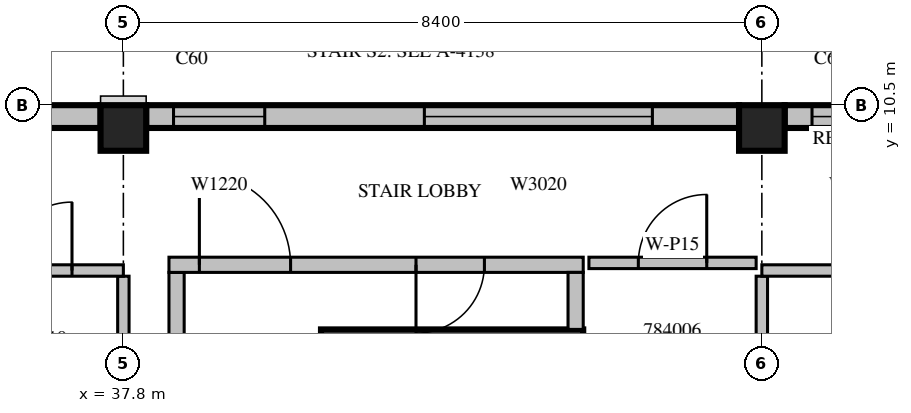
"""IFC4 building model, lengths in metres.
Left out: names, types, materials, properties, quantities, classifications, styles, units other than length and angle.
Written with IfcOpenShell. Run it as: python <this file> out.ifc"""

import sys

from ifc_helpers import new_model, si_unit, direction, frame, frame_2d, origin, origin_2d, place, context, subcontext, project, spatial, rectangle, extrude, source, transform, mapped, element, fill, save


model = new_model("IFC4")
c1 = context("Model", 3, precision=1e-05, world=origin(), true_north=direction((0.0, 1.0)))
c2 = subcontext(c1, "Body", "Model", "MODEL_VIEW")
j1 = project(units=[si_unit("LENGTHUNIT", "METRE"), si_unit("PLANEANGLEUNIT", "RADIAN")], contexts=[c1])
p1 = place(None, origin())
s1 = spatial("IfcSite", under=j1, at=p1, CompositionType="ELEMENT")
p2 = place(p1, origin())
s2 = spatial("IfcBuilding", under=s1, at=p2, CompositionType="ELEMENT")
p3 = place(p2, frame((0.0, 0.0, 354.5)))
s3 = spatial("IfcBuildingStorey", under=s2, at=p3, CompositionType="ELEMENT", Elevation=354.5)
m1 = source(origin(), c2, "Body", "SweptSolid", [
    extrude(rectangle(XDim=0.6, YDim=0.6, at=origin_2d()), origin(), (0.0, 0.0, 1.0), 3.5),
])
for number, where, z_axis, x_axis in (
    (1, (37.8, 10.2, 0.0), (0.0, 0.0, 1.0), (1.0, 0.0, 0.0)),
    (2, (46.2, 10.2, 0.0), (0.0, 0.0, 1.0), (1.0, 0.0, 0.0)),
):
    element("IfcColumn", number, at=place(p3, frame(where, z_axis=z_axis, x_axis=x_axis)), inside=s3, PredefinedType="COLUMN", context=c2, shape_type="MappedRepresentation", body=[
        mapped(m1, transform((0.0, 0.0, 0.0), scale=1.0)),
    ])
m2 = source(origin(), c2, "Body", "SweptSolid", [
    extrude(rectangle(XDim=3.06, YDim=0.3, at=frame_2d((1.53, 0.0))), origin(), (0.0, 0.0, 1.0), 3.1),
])
p4 = place(p3, frame((49.56, 10.35, 0.0), z_axis=(0.0, 0.0, 1.0), x_axis=(-1.0, 0.0, 0.0)))
e3 = element("IfcWall", 3, at=p4, inside=s3, PredefinedType="STANDARD", context=c2, shape_type="MappedRepresentation", body=[
    mapped(m2, transform((0.0, 0.0, 0.0), scale=1.0)),
])
m3 = source(origin(), c2, "Body", "SweptSolid", [
    extrude(rectangle(XDim=1.2, YDim=2.0, at=frame_2d((0.6, 1.0))), frame((0.0, 0.16, 0.0), z_axis=(0.0, -1.0, 0.0), x_axis=(1.0, 0.0, 0.0)), (0.0, 0.0, 1.0), 0.32),
])
p5 = place(p4, frame((1.5, 0.0, 0.6)))
e4 = element("IfcOpeningElement", 4, at=p5, cuts=e3, PredefinedType="OPENING", context=c2, shape_type="MappedRepresentation", body=[
    mapped(m3, transform((0.0, 0.0, 0.0), scale=1.0)),
])
m4 = source(origin(), c2, "Body", "SweptSolid", [
    extrude(rectangle(XDim=7.8, YDim=0.3, at=frame_2d((3.9, 0.0))), origin(), (0.0, 0.0, 1.0), 3.1),
])
p6 = place(p3, frame((45.9, 10.35, 0.0), z_axis=(0.0, 0.0, 1.0), x_axis=(-1.0, 0.0, 0.0)))
e5 = element("IfcWall", 5, at=p6, inside=s3, PredefinedType="STANDARD", context=c2, shape_type="MappedRepresentation", body=[
    mapped(m4, transform((0.0, 0.0, 0.0), scale=1.0)),
])
m5 = source(origin(), c2, "Body", "SweptSolid", [
    extrude(rectangle(XDim=3.0, YDim=2.0, at=frame_2d((1.5, 1.0))), frame((0.0, 0.16, 0.0), z_axis=(0.0, -1.0, 0.0), x_axis=(1.0, 0.0, 0.0)), (0.0, 0.0, 1.0), 0.32),
])
p7 = place(p6, frame((1.14, 0.0, 0.6)))
e6 = element("IfcOpeningElement", 6, at=p7, cuts=e5, PredefinedType="OPENING", context=c2, shape_type="MappedRepresentation", body=[
    mapped(m5, transform((0.0, 0.0, 0.0), scale=1.0)),
])
p8 = place(p6, frame((6.24, 0.0, 0.6)))
e7 = element("IfcOpeningElement", 7, at=p8, cuts=e5, PredefinedType="OPENING", context=c2, shape_type="MappedRepresentation", body=[
    mapped(m3, transform((0.0, 0.0, 0.0), scale=1.0)),
])
p9 = place(p3, frame((37.5, 10.35, 0.0), z_axis=(0.0, 0.0, 1.0), x_axis=(-1.0, 0.0, 0.0)))
e8 = element("IfcWall", 8, at=p9, inside=s3, PredefinedType="STANDARD", context=c2, shape_type="MappedRepresentation", body=[
    mapped(m4, transform((0.0, 0.0, 0.0), scale=1.0)),
])
p10 = place(p9, frame((1.14, 0.0, 0.6)))
e9 = element("IfcOpeningElement", 9, at=p10, cuts=e8, PredefinedType="OPENING", context=c2, shape_type="MappedRepresentation", body=[
    mapped(m5, transform((0.0, 0.0, 0.0), scale=1.0)),
])
p11 = place(p9, frame((6.24, 0.0, 0.6)))
e10 = element("IfcOpeningElement", 10, at=p11, cuts=e8, PredefinedType="OPENING", context=c2, shape_type="MappedRepresentation", body=[
    mapped(m3, transform((0.0, 0.0, 0.0), scale=1.0)),
])
m6 = source(origin(), c2, "Body", "SweptSolid", [
    extrude(rectangle(XDim=3.45, YDim=0.25, at=frame_2d((1.725, 0.0))), origin(), (0.0, 0.0, 1.0), 3.1),
])
p12 = place(p3, frame((40.4, 7.425, 0.0), z_axis=(0.0, 0.0, 1.0), x_axis=(1.0, 0.0, 0.0)))
e11 = element("IfcWall", 11, at=p12, inside=s3, PredefinedType="SOLIDWALL", context=c2, shape_type="MappedRepresentation", body=[
    mapped(m6, transform((0.0, 0.0, 0.0), scale=1.0)),
])
m7 = source(origin(), c2, "Body", "SweptSolid", [
    extrude(rectangle(XDim=8.0, YDim=0.2, at=frame_2d((4.0, 0.0))), origin(), (0.0, 0.0, 1.0), 3.1),
])
p13 = place(p3, frame((38.5, 0.3, 0.0), z_axis=(0.0, 0.0, 1.0), x_axis=(0.0, 1.0, 0.0)))
e12 = element("IfcWall", 12, at=p13, inside=s3, PredefinedType="PARTITIONING", context=c2, shape_type="MappedRepresentation", body=[
    mapped(m7, transform((0.0, 0.0, 0.0), scale=1.0)),
])
m8 = source(origin(), c2, "Body", "SweptSolid", [
    extrude(rectangle(XDim=5.45, YDim=0.2, at=frame_2d((2.725, 0.0))), origin(), (0.0, 0.0, 1.0), 3.1),
])
p14 = place(p3, frame((38.4, 8.4, 0.0), z_axis=(0.0, 0.0, 1.0), x_axis=(1.0, 0.0, 0.0)))
e13 = element("IfcWall", 13, at=p14, inside=s3, PredefinedType="PARTITIONING", context=c2, shape_type="MappedRepresentation", body=[
    mapped(m8, transform((0.0, 0.0, 0.0), scale=1.0)),
])
m9 = source(origin(), c2, "Body", "SweptSolid", [
    extrude(rectangle(XDim=1.2, YDim=2.1, at=frame_2d((0.6, 1.05))), frame((0.0, 0.11, 0.0), z_axis=(0.0, -1.0, 0.0), x_axis=(1.0, 0.0, 0.0)), (0.0, 0.0, 1.0), 0.22),
])
p15 = place(p14, frame((0.4, 0.0, 0.0)))
e14 = element("IfcOpeningElement", 14, at=p15, cuts=e13, PredefinedType="OPENING", context=c2, shape_type="MappedRepresentation", body=[
    mapped(m9, transform((0.0, 0.0, 0.0), scale=1.0)),
])
m10 = source(origin(), c2, "Body", "SweptSolid", [
    extrude(rectangle(XDim=0.9, YDim=2.1, at=frame_2d((0.45, 1.05))), frame((0.0, 0.11, 0.0), z_axis=(0.0, -1.0, 0.0), x_axis=(1.0, 0.0, 0.0)), (0.0, 0.0, 1.0), 0.22),
])
p16 = place(p14, frame((3.25, 0.0, 0.0)))
e15 = element("IfcOpeningElement", 15, at=p16, cuts=e13, PredefinedType="OPENING", context=c2, shape_type="MappedRepresentation", body=[
    mapped(m10, transform((0.0, 0.0, 0.0), scale=1.0)),
])
m11 = source(origin(), c2, "Body", "SweptSolid", [
    extrude(rectangle(XDim=0.75, YDim=0.2, at=frame_2d((0.375, 0.0))), origin(), (0.0, 0.0, 1.0), 3.1),
])
p17 = place(p3, frame((43.75, 7.55, 0.0), z_axis=(0.0, 0.0, 1.0), x_axis=(0.0, 1.0, 0.0)))
e16 = element("IfcWall", 16, at=p17, inside=s3, PredefinedType="PARTITIONING", context=c2, shape_type="MappedRepresentation", body=[
    mapped(m11, transform((0.0, 0.0, 0.0), scale=1.0)),
])
m12 = source(origin(), c2, "Body", "SweptSolid", [
    extrude(rectangle(XDim=2.2, YDim=0.15, at=frame_2d((1.1, 0.0))), origin(), (0.0, 0.0, 1.0), 3.1),
])
p18 = place(p3, frame((46.125, 8.425, 0.0), z_axis=(0.0, 0.0, 1.0), x_axis=(-1.0, 0.0, 0.0)))
e17 = element("IfcWall", 17, at=p18, inside=s3, PredefinedType="PARTITIONING", context=c2, shape_type="MappedRepresentation", body=[
    mapped(m12, transform((0.0, 0.0, 0.0), scale=1.0)),
])
m13 = source(origin(), c2, "Body", "SweptSolid", [
    extrude(rectangle(XDim=0.9, YDim=2.1, at=frame_2d((0.45, 1.05))), frame((0.0, 0.085, 0.0), z_axis=(0.0, -1.0, 0.0), x_axis=(1.0, 0.0, 0.0)), (0.0, 0.0, 1.0), 0.17),
])
p19 = place(p18, frame((0.65, 0.0, 0.0)))
e18 = element("IfcOpeningElement", 18, at=p19, cuts=e17, PredefinedType="OPENING", context=c2, shape_type="MappedRepresentation", body=[
    mapped(m13, transform((0.0, 0.0, 0.0), scale=1.0)),
])
m14 = source(origin(), c2, "Body", "SweptSolid", [
    extrude(rectangle(XDim=2.4, YDim=0.15, at=frame_2d((1.2, 0.0))), origin(), (0.0, 0.0, 1.0), 3.1),
])
for number, where, z_axis, x_axis in (
    (19, (37.8, 5.85, 0.0), (0.0, 0.0, 1.0), (0.0, 1.0, 0.0)),
    (20, (46.2, 5.85, 0.0), (0.0, 0.0, 1.0), (0.0, 1.0, 0.0)),
):
    element("IfcWall", number, at=place(p3, frame(where, z_axis=z_axis, x_axis=x_axis)), inside=s3, PredefinedType="PARTITIONING", context=c2, shape_type="MappedRepresentation", body=[
        mapped(m14, transform((0.0, 0.0, 0.0), scale=1.0)),
    ])
m15 = source(origin(), c2, "Body", "SweptSolid", [
    extrude(rectangle(XDim=8.4, YDim=0.15, at=frame_2d((4.2, 0.0))), origin(), (0.0, 0.0, 1.0), 3.1),
])
p20 = place(p3, frame((37.8, 8.325, 0.0), z_axis=(0.0, 0.0, 1.0), x_axis=(-1.0, 0.0, 0.0)))
e21 = element("IfcWall", 21, at=p20, inside=s3, PredefinedType="PARTITIONING", context=c2, shape_type="MappedRepresentation", body=[
    mapped(m15, transform((0.0, 0.0, 0.0), scale=1.0)),
])
m16 = source(origin(), c2, "Body", "SweptSolid", [
    extrude(rectangle(XDim=1.2, YDim=2.1, at=frame_2d((0.6, 1.05))), frame((0.0, 0.085, 0.0), z_axis=(0.0, -1.0, 0.0), x_axis=(1.0, 0.0, 0.0)), (0.0, 0.0, 1.0), 0.17),
])
p21 = place(p20, frame((5.698, 0.0, 0.0)))
e22 = element("IfcOpeningElement", 22, at=p21, cuts=e21, PredefinedType="OPENING", context=c2, shape_type="MappedRepresentation", body=[
    mapped(m16, transform((0.0, 0.0, 0.0), scale=1.0)),
])
p22 = place(p20, frame((2.773, 0.0, 0.0)))
e23 = element("IfcOpeningElement", 23, at=p22, cuts=e21, PredefinedType="OPENING", context=c2, shape_type="MappedRepresentation", body=[
    mapped(m13, transform((0.0, 0.0, 0.0), scale=1.0)),
])
p23 = place(p20, frame((0.676, 0.0, 0.0)))
e24 = element("IfcOpeningElement", 24, at=p23, cuts=e21, PredefinedType="OPENING", context=c2, shape_type="MappedRepresentation", body=[
    mapped(m13, transform((0.0, 0.0, 0.0), scale=1.0)),
])
m17 = source(origin(), c2, "Body", "SweptSolid", [
    extrude(rectangle(XDim=3.06, YDim=0.15, at=frame_2d((1.53, 0.0))), origin(), (0.0, 0.0, 1.0), 3.1),
])
p24 = place(p3, frame((49.26, 8.325, 0.0), z_axis=(0.0, 0.0, 1.0), x_axis=(-1.0, 0.0, 0.0)))
e25 = element("IfcWall", 25, at=p24, inside=s3, PredefinedType="PARTITIONING", context=c2, shape_type="MappedRepresentation", body=[
    mapped(m17, transform((0.0, 0.0, 0.0), scale=1.0)),
])
m18 = source(origin(), c2, "Body", "SweptSolid", [
    extrude(rectangle(XDim=1.0, YDim=2.1, at=frame_2d((0.5, 1.05))), frame((0.0, 0.085, 0.0), z_axis=(0.0, -1.0, 0.0), x_axis=(1.0, 0.0, 0.0)), (0.0, 0.0, 1.0), 0.17),
])
p25 = place(p24, frame((0.993, 0.0, 0.0)))
e26 = element("IfcOpeningElement", 26, at=p25, cuts=e25, PredefinedType="OPENING", context=c2, shape_type="MappedRepresentation", body=[
    mapped(m18, transform((0.0, 0.0, 0.0), scale=1.0)),
])
m19 = source(origin(), c2, "Body", "SweptSolid", [
    extrude(rectangle(XDim=1.2, YDim=2.0, at=frame_2d((0.6, 1.0))), frame((0.0, 0.03, 0.0), z_axis=(0.0, -1.0, 0.0), x_axis=(1.0, 0.0, 0.0)), (0.0, 0.0, 1.0), 0.06),
])
p26 = place(p5, origin())
e27 = element("IfcWindow", 27, at=p26, inside=s3, PartitioningType="SINGLE_PANEL", PredefinedType="WINDOW", context=c2, shape_type="MappedRepresentation", body=[
    mapped(m19, transform((0.0, 0.0, 0.0), scale=1.0)),
])
fill(e4, e27)
m20 = source(origin(), c2, "Body", "SweptSolid", [
    extrude(rectangle(XDim=3.0, YDim=2.0, at=frame_2d((1.5, 1.0))), frame((0.0, 0.03, 0.0), z_axis=(0.0, -1.0, 0.0), x_axis=(1.0, 0.0, 0.0)), (0.0, 0.0, 1.0), 0.06),
])
p27 = place(p7, origin())
e28 = element("IfcWindow", 28, at=p27, inside=s3, PartitioningType="SINGLE_PANEL", PredefinedType="WINDOW", context=c2, shape_type="MappedRepresentation", body=[
    mapped(m20, transform((0.0, 0.0, 0.0), scale=1.0)),
])
fill(e6, e28)
p28 = place(p8, origin())
e29 = element("IfcWindow", 29, at=p28, inside=s3, PartitioningType="SINGLE_PANEL", PredefinedType="WINDOW", context=c2, shape_type="MappedRepresentation", body=[
    mapped(m19, transform((0.0, 0.0, 0.0), scale=1.0)),
])
fill(e7, e29)
m21 = source(origin(), c2, "Body", "SweptSolid", [
    extrude(rectangle(XDim=1.2, YDim=2.1, at=frame_2d((0.6, 1.05))), frame((0.0, 0.025, 0.0), z_axis=(0.0, -1.0, 0.0), x_axis=(1.0, 0.0, 0.0)), (0.0, 0.0, 1.0), 0.05),
])
p29 = place(p15, origin())
e30 = element("IfcDoor", 30, at=p29, inside=s3, OperationType="SINGLE_SWING_LEFT", PredefinedType="DOOR", context=c2, shape_type="MappedRepresentation", body=[
    mapped(m21, transform((0.0, 0.0, 0.0), scale=1.0)),
])
fill(e14, e30)
m22 = source(origin(), c2, "Body", "SweptSolid", [
    extrude(rectangle(XDim=0.9, YDim=2.1, at=frame_2d((0.45, 1.05))), frame((0.0, 0.025, 0.0), z_axis=(0.0, -1.0, 0.0), x_axis=(1.0, 0.0, 0.0)), (0.0, 0.0, 1.0), 0.05),
])
p30 = place(p16, origin())
e31 = element("IfcDoor", 31, at=p30, inside=s3, OperationType="SINGLE_SWING_RIGHT", PredefinedType="DOOR", context=c2, shape_type="MappedRepresentation", body=[
    mapped(m22, transform((0.0, 0.0, 0.0), scale=1.0)),
])
fill(e15, e31)
p31 = place(p19, origin())
e32 = element("IfcDoor", 32, at=p31, inside=s3, OperationType="SINGLE_SWING_RIGHT", PredefinedType="DOOR", context=c2, shape_type="MappedRepresentation", body=[
    mapped(m22, transform((0.0, 0.0, 0.0), scale=1.0)),
])
fill(e18, e32)
p32 = place(p23, origin())
e33 = element("IfcDoor", 33, at=p32, inside=s3, OperationType="SINGLE_SWING_RIGHT", PredefinedType="DOOR", context=c2, shape_type="MappedRepresentation", body=[
    mapped(m22, transform((0.0, 0.0, 0.0), scale=1.0)),
])
fill(e24, e33)
save(model, sys.argv[1])
